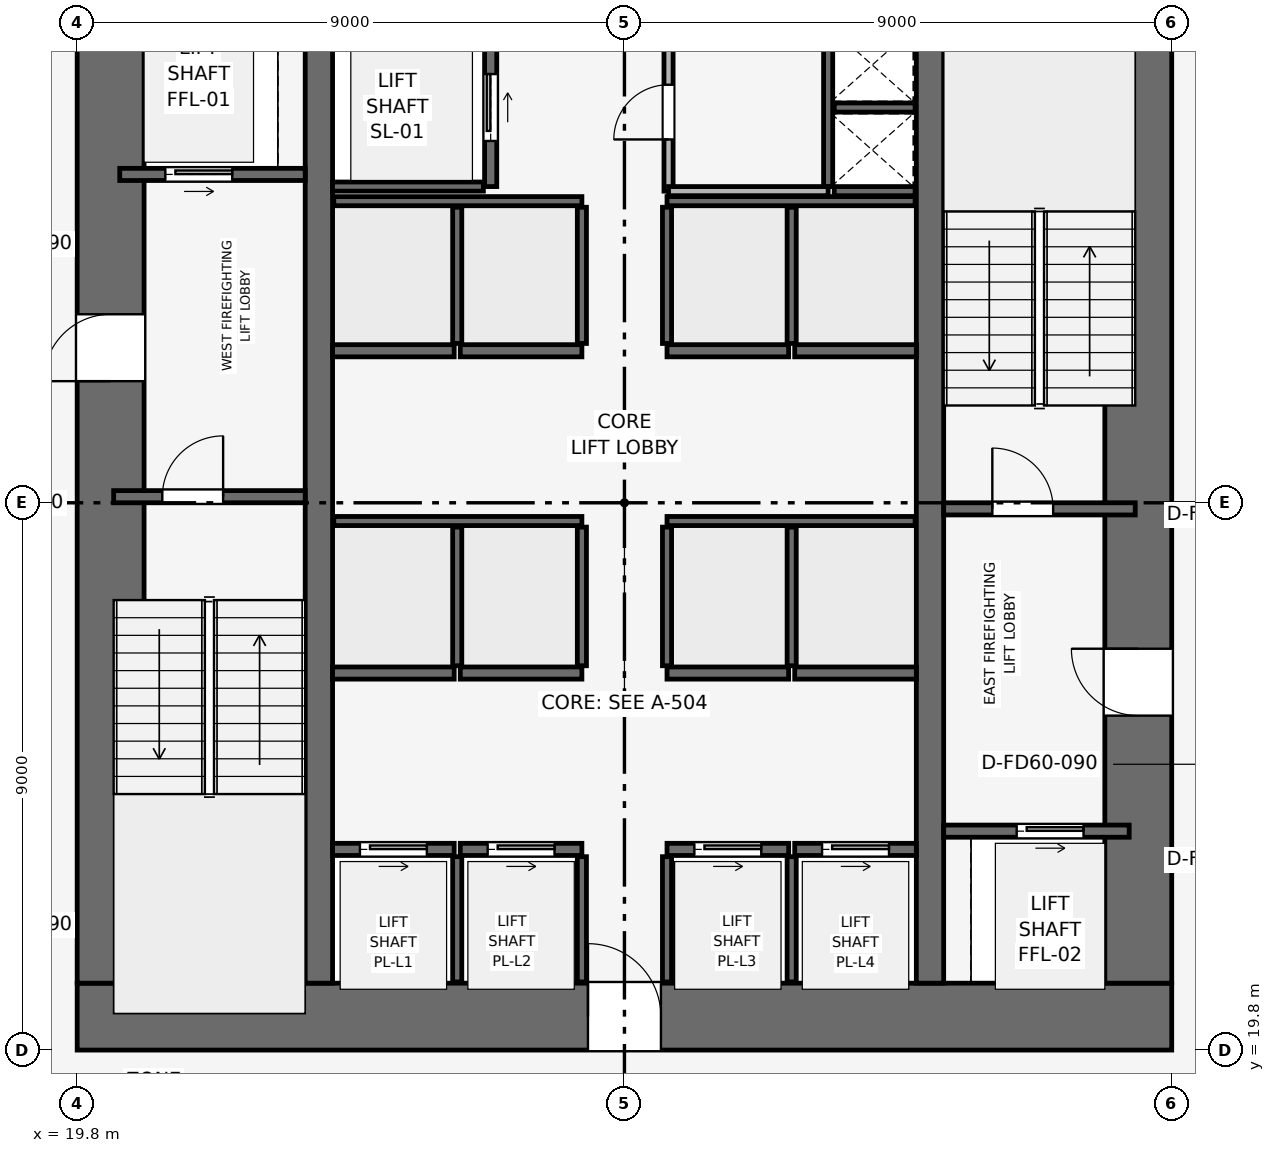
"""IFC4 building model, lengths in metres.
Left out: names, types, materials, properties, quantities, classifications, styles, units other than length and angle.
Written with IfcOpenShell. Run it as: python <this file> out.ifc"""

import sys

from ifc_helpers import new_model, si_unit, direction, frame, frame_2d, origin, place, context, subcontext, project, spatial, rectangle, extrude, element, fill, save


model = new_model("IFC4")
c1 = context("Model", 3, precision=1e-05, world=origin(), true_north=direction((0.0, 1.0)))
c2 = subcontext(c1, "Body", "Model", "MODEL_VIEW")
j1 = project(units=[si_unit("LENGTHUNIT", "METRE"), si_unit("PLANEANGLEUNIT", "RADIAN")], contexts=[c1])
p1 = place(None, origin())
s1 = spatial("IfcSite", under=j1, at=p1, CompositionType="ELEMENT")
p2 = place(p1, origin())
s2 = spatial("IfcBuilding", under=s1, at=p2, CompositionType="ELEMENT")
p3 = place(p2, frame((0.0, 0.0, 61.2)))
s3 = spatial("IfcBuildingStorey", under=s2, at=p3, CompositionType="ELEMENT", Elevation=61.2)
p4 = place(p3, frame((19.8, 20.35, 0.0), z_axis=(0.0, 0.0, 1.0), x_axis=(1.0, 0.0, 0.0)))
e1 = element("IfcWall", 1, at=p4, inside=s3, PredefinedType="SHEAR", context=c2, shape_type="SweptSolid", body=[
    extrude(rectangle(XDim=18.0, YDim=1.1, at=frame_2d((9.0, 0.0))), origin(), (0.0, 0.0, 1.0), 3.9),
])
p5 = place(p4, frame((8.4, 0.0, 0.0)))
e2 = element("IfcOpeningElement", 2, at=p5, cuts=e1, PredefinedType="OPENING", context=c2, shape_type="SweptSolid", body=[
    extrude(rectangle(XDim=1.2, YDim=2.2, at=frame_2d((0.6, 1.1))), frame((0.0, 0.56, 0.0), z_axis=(0.0, -1.0, 0.0), x_axis=(1.0, 0.0, 0.0)), (0.0, 0.0, 1.0), 1.12),
])
p6 = place(p3, frame((20.35, 20.9, 0.0), z_axis=(0.0, 0.0, 1.0), x_axis=(0.0, 1.0, 0.0)))
e3 = element("IfcWall", 3, at=p6, inside=s3, PredefinedType="SHEAR", context=c2, shape_type="SweptSolid", body=[
    extrude(rectangle(XDim=15.8, YDim=1.1, at=frame_2d((7.9, 0.0))), origin(), (0.0, 0.0, 1.0), 3.9),
])
p7 = place(p6, frame((9.9, 0.0, 0.0)))
e4 = element("IfcOpeningElement", 4, at=p7, cuts=e3, PredefinedType="OPENING", context=c2, shape_type="SweptSolid", body=[
    extrude(rectangle(XDim=1.1, YDim=2.15, at=frame_2d((0.55, 1.075))), frame((0.0, 0.56, 0.0), z_axis=(0.0, -1.0, 0.0), x_axis=(1.0, 0.0, 0.0)), (0.0, 0.0, 1.0), 1.12),
])
p8 = place(p3, frame((37.25, 20.9, 0.0), z_axis=(0.0, 0.0, 1.0), x_axis=(0.0, 1.0, 0.0)))
e5 = element("IfcWall", 5, at=p8, inside=s3, PredefinedType="SHEAR", context=c2, shape_type="SweptSolid", body=[
    extrude(rectangle(XDim=15.8, YDim=1.1, at=frame_2d((7.9, 0.0))), origin(), (0.0, 0.0, 1.0), 3.9),
])
p9 = place(p8, frame((4.4, 0.0, 0.0)))
e6 = element("IfcOpeningElement", 6, at=p9, cuts=e5, PredefinedType="OPENING", context=c2, shape_type="SweptSolid", body=[
    extrude(rectangle(XDim=1.1, YDim=2.15, at=frame_2d((0.55, 1.075))), frame((0.0, 0.56, 0.0), z_axis=(0.0, -1.0, 0.0), x_axis=(1.0, 0.0, 0.0)), (0.0, 0.0, 1.0), 1.12),
])
for number, where, z_axis, x_axis in (
    (7, (23.775, 20.9, 0.0), (0.0, 0.0, 1.0), (0.0, 1.0, 0.0)),
    (8, (33.825, 20.9, 0.0), (0.0, 0.0, 1.0), (0.0, 1.0, 0.0)),
):
    element("IfcWall", number, at=place(p3, frame(where, z_axis=z_axis, x_axis=x_axis)), inside=s3, PredefinedType="SHEAR", context=c2, shape_type="SweptSolid", body=[
        extrude(rectangle(XDim=15.8, YDim=0.45, at=frame_2d((7.9, 0.0))), origin(), (0.0, 0.0, 1.0), 3.9),
    ])
p10 = place(p3, frame((20.4, 28.9, 0.0), z_axis=(0.0, 0.0, 1.0), x_axis=(1.0, 0.0, 0.0)))
e9 = element("IfcWall", 9, at=p10, inside=s3, PredefinedType="SHEAR", context=c2, shape_type="SweptSolid", body=[
    extrude(rectangle(XDim=3.15, YDim=0.2, at=frame_2d((1.575, 0.0))), origin(), (0.0, 0.0, 1.0), 3.65),
])
p11 = place(p10, frame((0.8, 0.0, 0.0)))
e10 = element("IfcOpeningElement", 10, at=p11, cuts=e9, PredefinedType="OPENING", context=c2, shape_type="SweptSolid", body=[
    extrude(rectangle(XDim=1.0, YDim=2.1, at=frame_2d((0.5, 1.05))), frame((0.0, 0.11, 0.0), z_axis=(0.0, -1.0, 0.0), x_axis=(1.0, 0.0, 0.0)), (0.0, 0.0, 1.0), 0.22),
])
p12 = place(p3, frame((34.05, 28.7, 0.0), z_axis=(0.0, 0.0, 1.0), x_axis=(1.0, 0.0, 0.0)))
e11 = element("IfcWall", 11, at=p12, inside=s3, PredefinedType="SHEAR", context=c2, shape_type="SweptSolid", body=[
    extrude(rectangle(XDim=3.15, YDim=0.2, at=frame_2d((1.575, 0.0))), origin(), (0.0, 0.0, 1.0), 3.65),
])
p13 = place(p12, frame((0.8, 0.0, 0.0)))
e12 = element("IfcOpeningElement", 12, at=p13, cuts=e11, PredefinedType="OPENING", context=c2, shape_type="SweptSolid", body=[
    extrude(rectangle(XDim=1.0, YDim=2.1, at=frame_2d((0.5, 1.05))), frame((0.0, 0.11, 0.0), z_axis=(0.0, -1.0, 0.0), x_axis=(1.0, 0.0, 0.0)), (0.0, 0.0, 1.0), 0.22),
])
p14 = place(p3, frame((32.15, 34.0, 0.0), z_axis=(0.0, 0.0, 1.0), x_axis=(0.0, 1.0, 0.0)))
e13 = element("IfcWall", 13, at=p14, inside=s3, PredefinedType="SHEAR", context=c2, shape_type="SweptSolid", body=[
    extrude(rectangle(XDim=2.7, YDim=0.15, at=frame_2d((1.35, 0.0))), origin(), (0.0, 0.0, 1.0), 3.65),
])
for number, where, z_axis, x_axis in (
    (14, (32.25, 33.925, 0.0), (0.0, 0.0, 1.0), (1.0, 0.0, 0.0)),
    (15, (32.25, 35.3, 0.0), (0.0, 0.0, 1.0), (1.0, 0.0, 0.0)),
):
    element("IfcWall", number, at=place(p3, frame(where, z_axis=z_axis, x_axis=x_axis)), inside=s3, PredefinedType="SHEAR", context=c2, shape_type="SweptSolid", body=[
        extrude(rectangle(XDim=1.33, YDim=0.15, at=frame_2d((0.665, 0.0))), origin(), (0.0, 0.0, 1.0), 3.65),
    ])
p15 = place(p3, frame((20.5, 34.2, 0.0), z_axis=(0.0, 0.0, 1.0), x_axis=(1.0, 0.0, 0.0)))
e16 = element("IfcWall", 16, at=p15, inside=s3, PredefinedType="SHEAR", context=c2, shape_type="SweptSolid", body=[
    extrude(rectangle(XDim=3.05, YDim=0.2, at=frame_2d((1.525, 0.0))), origin(), (0.0, 0.0, 1.0), 3.65),
])
p16 = place(p15, frame((0.75, 0.0, 0.0)))
e17 = element("IfcOpeningElement", 17, at=p16, cuts=e16, PredefinedType="OPENING", context=c2, shape_type="SweptSolid", body=[
    extrude(rectangle(XDim=1.1, YDim=2.15, at=frame_2d((0.55, 1.075))), frame((0.0, 0.11, 0.0), z_axis=(0.0, -1.0, 0.0), x_axis=(1.0, 0.0, 0.0)), (0.0, 0.0, 1.0), 0.22),
])
p17 = place(p3, frame((34.05, 23.4, 0.0), z_axis=(0.0, 0.0, 1.0), x_axis=(1.0, 0.0, 0.0)))
e18 = element("IfcWall", 18, at=p17, inside=s3, PredefinedType="SHEAR", context=c2, shape_type="SweptSolid", body=[
    extrude(rectangle(XDim=3.05, YDim=0.2, at=frame_2d((1.525, 0.0))), origin(), (0.0, 0.0, 1.0), 3.65),
])
p18 = place(p17, frame((1.2, 0.0, 0.0)))
e19 = element("IfcOpeningElement", 19, at=p18, cuts=e18, PredefinedType="OPENING", context=c2, shape_type="SweptSolid", body=[
    extrude(rectangle(XDim=1.1, YDim=2.15, at=frame_2d((0.55, 1.075))), frame((0.0, 0.11, 0.0), z_axis=(0.0, -1.0, 0.0), x_axis=(1.0, 0.0, 0.0)), (0.0, 0.0, 1.0), 0.22),
])
p19 = place(p3, frame((26.6, 34.0, 0.0), z_axis=(0.0, 0.0, 1.0), x_axis=(0.0, 1.0, 0.0)))
e20 = element("IfcWall", 20, at=p19, inside=s3, PredefinedType="SHEAR", context=c2, shape_type="SweptSolid", body=[
    extrude(rectangle(XDim=2.7, YDim=0.2, at=frame_2d((1.35, 0.0))), origin(), (0.0, 0.0, 1.0), 3.65),
])
p20 = place(p19, frame((0.75, 0.0, 0.0)))
e21 = element("IfcOpeningElement", 21, at=p20, cuts=e20, PredefinedType="OPENING", context=c2, shape_type="SweptSolid", body=[
    extrude(rectangle(XDim=1.1, YDim=2.15, at=frame_2d((0.55, 1.075))), frame((0.0, 0.11, 0.0), z_axis=(0.0, -1.0, 0.0), x_axis=(1.0, 0.0, 0.0)), (0.0, 0.0, 1.0), 0.22),
])
p21 = place(p3, frame((24.0, 34.0, 0.0), z_axis=(0.0, 0.0, 1.0), x_axis=(1.0, 0.0, 0.0)))
e22 = element("IfcWall", 22, at=p21, inside=s3, PredefinedType="SHEAR", context=c2, shape_type="SweptSolid", body=[
    extrude(rectangle(XDim=2.48, YDim=0.15, at=frame_2d((1.24, 0.0))), origin(), (0.0, 0.0, 1.0), 3.65),
])
p22 = place(p3, frame((24.0, 23.1, 0.0), z_axis=(0.0, 0.0, 1.0), x_axis=(1.0, 0.0, 0.0)))
e23 = element("IfcWall", 23, at=p22, inside=s3, PredefinedType="SHEAR", context=c2, shape_type="SweptSolid", body=[
    extrude(rectangle(XDim=2.0, YDim=0.2, at=frame_2d((1.0, 0.0))), origin(), (0.0, 0.0, 1.0), 3.65),
])
p23 = place(p22, frame((0.45, 0.0, 0.0)))
e24 = element("IfcOpeningElement", 24, at=p23, cuts=e23, PredefinedType="OPENING", context=c2, shape_type="SweptSolid", body=[
    extrude(rectangle(XDim=1.1, YDim=2.15, at=frame_2d((0.55, 1.075))), frame((0.0, 0.11, 0.0), z_axis=(0.0, -1.0, 0.0), x_axis=(1.0, 0.0, 0.0)), (0.0, 0.0, 1.0), 0.22),
])
p24 = place(p3, frame((26.1, 23.1, 0.0), z_axis=(0.0, 0.0, 1.0), x_axis=(1.0, 0.0, 0.0)))
e25 = element("IfcWall", 25, at=p24, inside=s3, PredefinedType="SHEAR", context=c2, shape_type="SweptSolid", body=[
    extrude(rectangle(XDim=2.0, YDim=0.2, at=frame_2d((1.0, 0.0))), origin(), (0.0, 0.0, 1.0), 3.65),
])
p25 = place(p24, frame((0.45, 0.0, 0.0)))
e26 = element("IfcOpeningElement", 26, at=p25, cuts=e25, PredefinedType="OPENING", context=c2, shape_type="SweptSolid", body=[
    extrude(rectangle(XDim=1.1, YDim=2.15, at=frame_2d((0.55, 1.075))), frame((0.0, 0.11, 0.0), z_axis=(0.0, -1.0, 0.0), x_axis=(1.0, 0.0, 0.0)), (0.0, 0.0, 1.0), 0.22),
])
p26 = place(p3, frame((29.5, 23.1, 0.0), z_axis=(0.0, 0.0, 1.0), x_axis=(1.0, 0.0, 0.0)))
e27 = element("IfcWall", 27, at=p26, inside=s3, PredefinedType="SHEAR", context=c2, shape_type="SweptSolid", body=[
    extrude(rectangle(XDim=2.0, YDim=0.2, at=frame_2d((1.0, 0.0))), origin(), (0.0, 0.0, 1.0), 3.65),
])
p27 = place(p26, frame((0.45, 0.0, 0.0)))
e28 = element("IfcOpeningElement", 28, at=p27, cuts=e27, PredefinedType="OPENING", context=c2, shape_type="SweptSolid", body=[
    extrude(rectangle(XDim=1.1, YDim=2.15, at=frame_2d((0.55, 1.075))), frame((0.0, 0.11, 0.0), z_axis=(0.0, -1.0, 0.0), x_axis=(1.0, 0.0, 0.0)), (0.0, 0.0, 1.0), 0.22),
])
p28 = place(p3, frame((31.6, 23.1, 0.0), z_axis=(0.0, 0.0, 1.0), x_axis=(1.0, 0.0, 0.0)))
e29 = element("IfcWall", 29, at=p28, inside=s3, PredefinedType="SHEAR", context=c2, shape_type="SweptSolid", body=[
    extrude(rectangle(XDim=2.0, YDim=0.2, at=frame_2d((1.0, 0.0))), origin(), (0.0, 0.0, 1.0), 3.65),
])
p29 = place(p28, frame((0.45, 0.0, 0.0)))
e30 = element("IfcOpeningElement", 30, at=p29, cuts=e29, PredefinedType="OPENING", context=c2, shape_type="SweptSolid", body=[
    extrude(rectangle(XDim=1.1, YDim=2.15, at=frame_2d((0.55, 1.075))), frame((0.0, 0.11, 0.0), z_axis=(0.0, -1.0, 0.0), x_axis=(1.0, 0.0, 0.0)), (0.0, 0.0, 1.0), 0.22),
])
for number, where, z_axis, x_axis in (
    (31, (24.0, 26.0, 0.0), (0.0, 0.0, 1.0), (1.0, 0.0, 0.0)),
    (32, (26.1, 26.0, 0.0), (0.0, 0.0, 1.0), (1.0, 0.0, 0.0)),
    (33, (29.5, 26.0, 0.0), (0.0, 0.0, 1.0), (1.0, 0.0, 0.0)),
    (34, (31.6, 26.0, 0.0), (0.0, 0.0, 1.0), (1.0, 0.0, 0.0)),
    (35, (24.0, 31.3, 0.0), (0.0, 0.0, 1.0), (1.0, 0.0, 0.0)),
    (36, (26.1, 31.3, 0.0), (0.0, 0.0, 1.0), (1.0, 0.0, 0.0)),
    (37, (29.5, 31.3, 0.0), (0.0, 0.0, 1.0), (1.0, 0.0, 0.0)),
    (38, (31.6, 31.3, 0.0), (0.0, 0.0, 1.0), (1.0, 0.0, 0.0)),
):
    element("IfcWall", number, at=place(p3, frame(where, z_axis=z_axis, x_axis=x_axis)), inside=s3, PredefinedType="SHEAR", context=c2, shape_type="SweptSolid", body=[
        extrude(rectangle(XDim=2.0, YDim=0.2, at=frame_2d((1.0, 0.0))), origin(), (0.0, 0.0, 1.0), 3.65),
    ])
for number, where, z_axis, x_axis in (
    (39, (26.05, 20.92, 0.0), (0.0, 0.0, 1.0), (0.0, 1.0, 0.0)),
    (40, (28.1, 20.92, 0.0), (0.0, 0.0, 1.0), (0.0, 1.0, 0.0)),
    (41, (29.5, 20.92, 0.0), (0.0, 0.0, 1.0), (0.0, 1.0, 0.0)),
    (42, (31.55, 20.92, 0.0), (0.0, 0.0, 1.0), (0.0, 1.0, 0.0)),
):
    element("IfcWall", number, at=place(p3, frame(where, z_axis=z_axis, x_axis=x_axis)), inside=s3, PredefinedType="SHEAR", context=c2, shape_type="SweptSolid", body=[
        extrude(rectangle(XDim=2.06, YDim=0.15, at=frame_2d((1.03, 0.0))), origin(), (0.0, 0.0, 1.0), 3.65),
    ])
for number, where, z_axis, x_axis in (
    (43, (24.02, 28.5, 0.0), (0.0, 0.0, 1.0), (1.0, 0.0, 0.0)),
    (44, (29.5, 28.5, 0.0), (0.0, 0.0, 1.0), (1.0, 0.0, 0.0)),
):
    element("IfcWall", number, at=place(p3, frame(where, z_axis=z_axis, x_axis=x_axis)), inside=s3, PredefinedType="SHEAR", context=c2, shape_type="SweptSolid", body=[
        extrude(rectangle(XDim=4.08, YDim=0.15, at=frame_2d((2.04, 0.0))), origin(), (0.0, 0.0, 1.0), 3.65),
    ])
for number, where, z_axis, x_axis in (
    (45, (26.05, 26.12, 0.0), (0.0, 0.0, 1.0), (0.0, 1.0, 0.0)),
    (46, (28.1, 26.12, 0.0), (0.0, 0.0, 1.0), (0.0, 1.0, 0.0)),
    (47, (29.5, 26.12, 0.0), (0.0, 0.0, 1.0), (0.0, 1.0, 0.0)),
    (48, (31.55, 26.12, 0.0), (0.0, 0.0, 1.0), (0.0, 1.0, 0.0)),
):
    element("IfcWall", number, at=place(p3, frame(where, z_axis=z_axis, x_axis=x_axis)), inside=s3, PredefinedType="SHEAR", context=c2, shape_type="SweptSolid", body=[
        extrude(rectangle(XDim=2.28, YDim=0.15, at=frame_2d((1.14, 0.0))), origin(), (0.0, 0.0, 1.0), 3.65),
    ])
for number, where, z_axis, x_axis in (
    (49, (24.02, 33.76, 0.0), (0.0, 0.0, 1.0), (1.0, 0.0, 0.0)),
    (50, (29.5, 33.76, 0.0), (0.0, 0.0, 1.0), (1.0, 0.0, 0.0)),
):
    element("IfcWall", number, at=place(p3, frame(where, z_axis=z_axis, x_axis=x_axis)), inside=s3, PredefinedType="SHEAR", context=c2, shape_type="SweptSolid", body=[
        extrude(rectangle(XDim=4.08, YDim=0.15, at=frame_2d((2.04, 0.0))), origin(), (0.0, 0.0, 1.0), 3.65),
    ])
for number, where, z_axis, x_axis in (
    (51, (26.05, 31.42, 0.0), (0.0, 0.0, 1.0), (0.0, 1.0, 0.0)),
    (52, (28.1, 31.42, 0.0), (0.0, 0.0, 1.0), (0.0, 1.0, 0.0)),
    (53, (29.5, 31.42, 0.0), (0.0, 0.0, 1.0), (0.0, 1.0, 0.0)),
    (54, (31.55, 31.42, 0.0), (0.0, 0.0, 1.0), (0.0, 1.0, 0.0)),
):
    element("IfcWall", number, at=place(p3, frame(where, z_axis=z_axis, x_axis=x_axis)), inside=s3, PredefinedType="SHEAR", context=c2, shape_type="SweptSolid", body=[
        extrude(rectangle(XDim=2.24, YDim=0.15, at=frame_2d((1.12, 0.0))), origin(), (0.0, 0.0, 1.0), 3.65),
    ])
p30 = place(p3, frame((29.525, 33.925, 0.0), z_axis=(0.0, 0.0, 1.0), x_axis=(0.0, 1.0, 0.0)))
e55 = element("IfcWall", 55, at=p30, inside=s3, PredefinedType="PARTITIONING", context=c2, shape_type="SweptSolid", body=[
    extrude(rectangle(XDim=2.775, YDim=0.15, at=frame_2d((1.387, 0.0))), origin(), (0.0, 0.0, 1.0), 3.65),
])
p31 = place(p30, frame((0.85, 0.0, 0.0)))
e56 = element("IfcOpeningElement", 56, at=p31, cuts=e55, PredefinedType="OPENING", context=c2, shape_type="SweptSolid", body=[
    extrude(rectangle(XDim=0.9, YDim=2.1, at=frame_2d((0.45, 1.05))), frame((0.0, 0.085, 0.0), z_axis=(0.0, -1.0, 0.0), x_axis=(1.0, 0.0, 0.0)), (0.0, 0.0, 1.0), 0.17),
])
p32 = place(p3, frame((29.525, 33.925, 0.0), z_axis=(0.0, 0.0, 1.0), x_axis=(1.0, 0.0, 0.0)))
e57 = element("IfcWall", 57, at=p32, inside=s3, PredefinedType="PARTITIONING", context=c2, shape_type="SweptSolid", body=[
    extrude(rectangle(XDim=2.625, YDim=0.15, at=frame_2d((1.312, 0.0))), origin(), (0.0, 0.0, 1.0), 3.65),
])
p33 = place(p11, origin())
e58 = element("IfcDoor", 58, at=p33, inside=s3, OperationType="SINGLE_SWING_RIGHT", PredefinedType="DOOR", context=c2, shape_type="SweptSolid", body=[
    extrude(rectangle(XDim=1.0, YDim=2.1, at=frame_2d((0.5, 1.05))), frame((0.0, 0.025, 0.0), z_axis=(0.0, -1.0, 0.0), x_axis=(1.0, 0.0, 0.0)), (0.0, 0.0, 1.0), 0.05),
])
fill(e10, e58)
p34 = place(p13, origin())
e59 = element("IfcDoor", 59, at=p34, inside=s3, OperationType="SINGLE_SWING_LEFT", PredefinedType="DOOR", context=c2, shape_type="SweptSolid", body=[
    extrude(rectangle(XDim=1.0, YDim=2.1, at=frame_2d((0.5, 1.05))), frame((0.0, 0.025, 0.0), z_axis=(0.0, -1.0, 0.0), x_axis=(1.0, 0.0, 0.0)), (0.0, 0.0, 1.0), 0.05),
])
fill(e12, e59)
p35 = place(p16, origin())
e60 = element("IfcDoor", 60, at=p35, inside=s3, OperationType="SLIDING_TO_RIGHT", PredefinedType="DOOR", context=c2, shape_type="SweptSolid", body=[
    extrude(rectangle(XDim=1.1, YDim=2.15, at=frame_2d((0.55, 1.075))), frame((0.0, 0.025, 0.0), z_axis=(0.0, -1.0, 0.0), x_axis=(1.0, 0.0, 0.0)), (0.0, 0.0, 1.0), 0.05),
])
fill(e17, e60)
p36 = place(p18, origin())
e61 = element("IfcDoor", 61, at=p36, inside=s3, OperationType="SLIDING_TO_RIGHT", PredefinedType="DOOR", context=c2, shape_type="SweptSolid", body=[
    extrude(rectangle(XDim=1.1, YDim=2.15, at=frame_2d((0.55, 1.075))), frame((0.0, 0.025, 0.0), z_axis=(0.0, -1.0, 0.0), x_axis=(1.0, 0.0, 0.0)), (0.0, 0.0, 1.0), 0.05),
])
fill(e19, e61)
p37 = place(p20, origin())
e62 = element("IfcDoor", 62, at=p37, inside=s3, OperationType="SLIDING_TO_RIGHT", PredefinedType="DOOR", context=c2, shape_type="SweptSolid", body=[
    extrude(rectangle(XDim=1.1, YDim=2.15, at=frame_2d((0.55, 1.075))), frame((0.0, 0.025, 0.0), z_axis=(0.0, -1.0, 0.0), x_axis=(1.0, 0.0, 0.0)), (0.0, 0.0, 1.0), 0.05),
])
fill(e21, e62)
p38 = place(p23, origin())
e63 = element("IfcDoor", 63, at=p38, inside=s3, OperationType="SLIDING_TO_RIGHT", PredefinedType="DOOR", context=c2, shape_type="SweptSolid", body=[
    extrude(rectangle(XDim=1.1, YDim=2.15, at=frame_2d((0.55, 1.075))), frame((0.0, 0.025, 0.0), z_axis=(0.0, -1.0, 0.0), x_axis=(1.0, 0.0, 0.0)), (0.0, 0.0, 1.0), 0.05),
])
fill(e24, e63)
p39 = place(p25, origin())
e64 = element("IfcDoor", 64, at=p39, inside=s3, OperationType="SLIDING_TO_RIGHT", PredefinedType="DOOR", context=c2, shape_type="SweptSolid", body=[
    extrude(rectangle(XDim=1.1, YDim=2.15, at=frame_2d((0.55, 1.075))), frame((0.0, 0.025, 0.0), z_axis=(0.0, -1.0, 0.0), x_axis=(1.0, 0.0, 0.0)), (0.0, 0.0, 1.0), 0.05),
])
fill(e26, e64)
p40 = place(p27, origin())
e65 = element("IfcDoor", 65, at=p40, inside=s3, OperationType="SLIDING_TO_RIGHT", PredefinedType="DOOR", context=c2, shape_type="SweptSolid", body=[
    extrude(rectangle(XDim=1.1, YDim=2.15, at=frame_2d((0.55, 1.075))), frame((0.0, 0.025, 0.0), z_axis=(0.0, -1.0, 0.0), x_axis=(1.0, 0.0, 0.0)), (0.0, 0.0, 1.0), 0.05),
])
fill(e28, e65)
p41 = place(p29, origin())
e66 = element("IfcDoor", 66, at=p41, inside=s3, OperationType="SLIDING_TO_RIGHT", PredefinedType="DOOR", context=c2, shape_type="SweptSolid", body=[
    extrude(rectangle(XDim=1.1, YDim=2.15, at=frame_2d((0.55, 1.075))), frame((0.0, 0.025, 0.0), z_axis=(0.0, -1.0, 0.0), x_axis=(1.0, 0.0, 0.0)), (0.0, 0.0, 1.0), 0.05),
])
fill(e30, e66)
p42 = place(p31, origin())
e67 = element("IfcDoor", 67, at=p42, inside=s3, OperationType="SINGLE_SWING_LEFT", PredefinedType="DOOR", context=c2, shape_type="SweptSolid", body=[
    extrude(rectangle(XDim=0.9, YDim=2.1, at=frame_2d((0.45, 1.05))), frame((0.0, 0.025, 0.0), z_axis=(0.0, -1.0, 0.0), x_axis=(1.0, 0.0, 0.0)), (0.0, 0.0, 1.0), 0.05),
])
fill(e56, e67)
p43 = place(p7, origin())
e68 = element("IfcDoor", 68, at=p43, inside=s3, OperationType="SINGLE_SWING_LEFT", PredefinedType="DOOR", context=c2, shape_type="SweptSolid", body=[
    extrude(rectangle(XDim=1.1, YDim=2.15, at=frame_2d((0.55, 1.075))), frame((0.0, 0.025, 0.0), z_axis=(0.0, -1.0, 0.0), x_axis=(1.0, 0.0, 0.0)), (0.0, 0.0, 1.0), 0.05),
])
fill(e4, e68)
p44 = place(p9, origin())
e69 = element("IfcDoor", 69, at=p44, inside=s3, OperationType="SINGLE_SWING_RIGHT", PredefinedType="DOOR", context=c2, shape_type="SweptSolid", body=[
    extrude(rectangle(XDim=1.1, YDim=2.15, at=frame_2d((0.55, 1.075))), frame((0.0, 0.025, 0.0), z_axis=(0.0, -1.0, 0.0), x_axis=(1.0, 0.0, 0.0)), (0.0, 0.0, 1.0), 0.05),
])
fill(e6, e69)
p45 = place(p5, origin())
e70 = element("IfcDoor", 70, at=p45, inside=s3, OperationType="SINGLE_SWING_LEFT", PredefinedType="DOOR", context=c2, shape_type="SweptSolid", body=[
    extrude(rectangle(XDim=1.2, YDim=2.2, at=frame_2d((0.6, 1.1))), frame((0.0, 0.025, 0.0), z_axis=(0.0, -1.0, 0.0), x_axis=(1.0, 0.0, 0.0)), (0.0, 0.0, 1.0), 0.05),
])
fill(e2, e70)
save(model, sys.argv[1])
